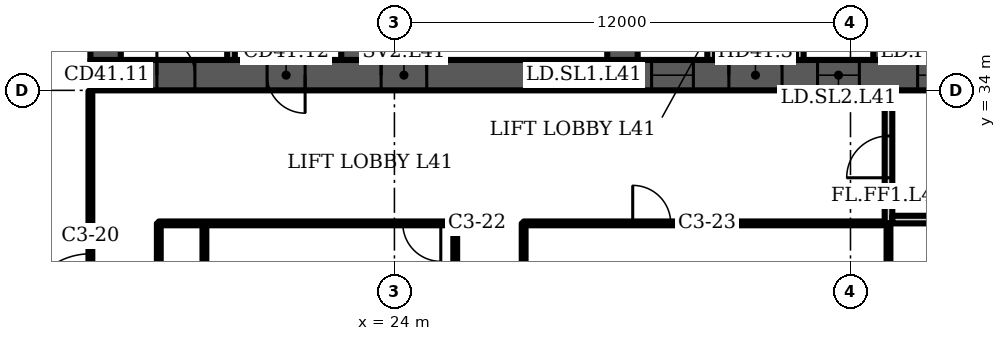
"""IFC4 building model, lengths in metres.
Left out: names, types, materials, properties, quantities, classifications, styles, units other than length and angle.
Written with IfcOpenShell. Run it as: python <this file> out.ifc"""

import sys

from ifc_helpers import new_model, si_unit, direction, frame, frame_2d, origin, place, context, subcontext, project, spatial, polyline, rectangle, outline, extrude, element, fill, save


model = new_model("IFC4")
c1 = context("Model", 3, precision=1e-05, world=origin(), true_north=direction((0.0, 1.0)))
c2 = subcontext(c1, "Body", "Model", "MODEL_VIEW")
j1 = project(units=[si_unit("LENGTHUNIT", "METRE"), si_unit("PLANEANGLEUNIT", "RADIAN")], contexts=[c1])
p1 = place(None, origin())
s1 = spatial("IfcSite", under=j1, at=p1, CompositionType="ELEMENT")
p2 = place(p1, origin())
s2 = spatial("IfcBuilding", under=s1, at=p2, CompositionType="ELEMENT")
p3 = place(p2, frame((0.0, 0.0, 169.9)))
s3 = spatial("IfcBuildingStorey", under=s2, at=p3, CompositionType="ELEMENT", Elevation=169.9)
p4 = place(p3, frame((16.0, 34.4, 0.0), z_axis=(0.0, 0.0, 1.0), x_axis=(1.0, 0.0, 0.0)))
e1 = element("IfcWall", 1, at=p4, inside=s3, PredefinedType="SHEAR", context=c2, shape_type="SweptSolid", body=[
    extrude(rectangle(XDim=42.0, YDim=0.8, at=frame_2d((21.0, 0.0))), origin(), (0.0, 0.0, 1.0), 3.6),
])
p5 = place(p4, frame((1.75, 0.0, 0.0)))
e2 = element("IfcOpeningElement", 2, at=p5, cuts=e1, PredefinedType="OPENING", context=c2, shape_type="SweptSolid", body=[
    extrude(rectangle(XDim=1.0, YDim=2.1, at=frame_2d((0.5, 1.05))), frame((0.0, 0.41, 0.0), z_axis=(0.0, -1.0, 0.0), x_axis=(1.0, 0.0, 0.0)), (0.0, 0.0, 1.0), 0.82),
])
p6 = place(p4, frame((4.65, 0.0, 0.0)))
e3 = element("IfcOpeningElement", 3, at=p6, cuts=e1, PredefinedType="OPENING", context=c2, shape_type="SweptSolid", body=[
    extrude(rectangle(XDim=1.0, YDim=2.1, at=frame_2d((0.5, 1.05))), frame((0.0, 0.41, 0.0), z_axis=(0.0, -1.0, 0.0), x_axis=(1.0, 0.0, 0.0)), (0.0, 0.0, 1.0), 0.82),
])
p7 = place(p4, frame((7.65, 0.0, 0.0)))
e4 = element("IfcOpeningElement", 4, at=p7, cuts=e1, PredefinedType="OPENING", context=c2, shape_type="SweptSolid", body=[
    extrude(rectangle(XDim=1.2, YDim=2.1, at=frame_2d((0.6, 1.05))), frame((0.0, 0.41, 0.0), z_axis=(0.0, -1.0, 0.0), x_axis=(1.0, 0.0, 0.0)), (0.0, 0.0, 1.0), 0.82),
])
p8 = place(p4, frame((14.767, 0.0, 0.0)))
e5 = element("IfcOpeningElement", 5, at=p8, cuts=e1, PredefinedType="OPENING", context=c2, shape_type="SweptSolid", body=[
    extrude(rectangle(XDim=1.1, YDim=2.1, at=frame_2d((0.55, 1.05))), frame((0.0, 0.41, 0.0), z_axis=(0.0, -1.0, 0.0), x_axis=(1.0, 0.0, 0.0)), (0.0, 0.0, 1.0), 0.82),
])
p9 = place(p4, frame((19.133, 0.0, 0.0)))
e6 = element("IfcOpeningElement", 6, at=p9, cuts=e1, PredefinedType="OPENING", context=c2, shape_type="SweptSolid", body=[
    extrude(rectangle(XDim=1.1, YDim=2.1, at=frame_2d((0.55, 1.05))), frame((0.0, 0.41, 0.0), z_axis=(0.0, -1.0, 0.0), x_axis=(1.0, 0.0, 0.0)), (0.0, 0.0, 1.0), 0.82),
])
p10 = place(p4, frame((16.8, 0.0, 0.0)))
e7 = element("IfcOpeningElement", 7, at=p10, cuts=e1, PredefinedType="OPENING", context=c2, shape_type="SweptSolid", body=[
    extrude(rectangle(XDim=1.4, YDim=2.1, at=frame_2d((0.7, 1.05))), frame((0.0, 0.41, 0.0), z_axis=(0.0, -1.0, 0.0), x_axis=(1.0, 0.0, 0.0)), (0.0, 0.0, 1.0), 0.82),
])
p11 = place(p4, frame((21.767, 0.0, 0.0)))
e8 = element("IfcOpeningElement", 8, at=p11, cuts=e1, PredefinedType="OPENING", context=c2, shape_type="SweptSolid", body=[
    extrude(rectangle(XDim=1.1, YDim=2.1, at=frame_2d((0.55, 1.05))), frame((0.0, 0.41, 0.0), z_axis=(0.0, -1.0, 0.0), x_axis=(1.0, 0.0, 0.0)), (0.0, 0.0, 1.0), 0.82),
])
p12 = place(p4, frame((23.95, 0.0, 0.0)))
e9 = element("IfcOpeningElement", 9, at=p12, cuts=e1, PredefinedType="OPENING", context=c2, shape_type="SweptSolid", body=[
    extrude(rectangle(XDim=1.1, YDim=2.1, at=frame_2d((0.55, 1.05))), frame((0.0, 0.41, 0.0), z_axis=(0.0, -1.0, 0.0), x_axis=(1.0, 0.0, 0.0)), (0.0, 0.0, 1.0), 0.82),
])
p13 = place(p4, frame((26.133, 0.0, 0.0)))
e10 = element("IfcOpeningElement", 10, at=p13, cuts=e1, PredefinedType="OPENING", context=c2, shape_type="SweptSolid", body=[
    extrude(rectangle(XDim=1.1, YDim=2.1, at=frame_2d((0.55, 1.05))), frame((0.0, 0.41, 0.0), z_axis=(0.0, -1.0, 0.0), x_axis=(1.0, 0.0, 0.0)), (0.0, 0.0, 1.0), 0.82),
])
p14 = place(p4, frame((33.15, 0.0, 0.0)))
e11 = element("IfcOpeningElement", 11, at=p14, cuts=e1, PredefinedType="OPENING", context=c2, shape_type="SweptSolid", body=[
    extrude(rectangle(XDim=1.2, YDim=2.1, at=frame_2d((0.6, 1.05))), frame((0.0, 0.41, 0.0), z_axis=(0.0, -1.0, 0.0), x_axis=(1.0, 0.0, 0.0)), (0.0, 0.0, 1.0), 0.82),
])
p15 = place(p4, frame((37.767, 0.0, 0.0)))
e12 = element("IfcOpeningElement", 12, at=p15, cuts=e1, PredefinedType="OPENING", context=c2, shape_type="SweptSolid", body=[
    extrude(rectangle(XDim=1.4, YDim=2.1, at=frame_2d((0.7, 1.05))), frame((0.0, 0.41, 0.0), z_axis=(0.0, -1.0, 0.0), x_axis=(1.0, 0.0, 0.0)), (0.0, 0.0, 1.0), 0.82),
])
p16 = place(p3, frame((16.4, 34.8, 0.0), z_axis=(0.0, 0.0, 1.0), x_axis=(0.0, 1.0, 0.0)))
e13 = element("IfcWall", 13, at=p16, inside=s3, PredefinedType="SHEAR", context=c2, shape_type="SweptSolid", body=[
    extrude(rectangle(XDim=13.184, YDim=0.8, at=frame_2d((6.592, 0.0))), origin(), (0.0, 0.0, 1.0), 3.6),
])
p17 = place(p3, frame((23.0, 34.8, 0.0), z_axis=(0.0, 0.0, 1.0), x_axis=(0.0, 1.0, 0.0)))
e14 = element("IfcWall", 14, at=p17, inside=s3, PredefinedType="SHEAR", context=c2, shape_type="SweptSolid", body=[
    extrude(rectangle(XDim=13.762, YDim=0.8, at=frame_2d((6.881, 0.0))), origin(), (0.0, 0.0, 1.0), 3.6),
])
p18 = place(p17, frame((10.0, 0.0, 0.0)))
e15 = element("IfcOpeningElement", 15, at=p18, cuts=e14, PredefinedType="OPENING", context=c2, shape_type="SweptSolid", body=[
    extrude(rectangle(XDim=1.0, YDim=2.1, at=frame_2d((0.5, 1.05))), frame((0.0, 0.41, 0.0), z_axis=(0.0, -1.0, 0.0), x_axis=(1.0, 0.0, 0.0)), (0.0, 0.0, 1.0), 0.82),
])
p19 = place(p3, frame((30.0, 34.8, 0.0), z_axis=(0.0, 0.0, 1.0), x_axis=(0.0, 1.0, 0.0)))
e16 = element("IfcWall", 16, at=p19, inside=s3, PredefinedType="SHEAR", context=c2, shape_type="SweptSolid", body=[
    extrude(rectangle(XDim=14.374, YDim=0.8, at=frame_2d((7.187, 0.0))), origin(), (0.0, 0.0, 1.0), 3.6),
])
p20 = place(p19, frame((3.6, 0.0, 0.0)))
e17 = element("IfcOpeningElement", 17, at=p20, cuts=e16, PredefinedType="OPENING", context=c2, shape_type="SweptSolid", body=[
    extrude(rectangle(XDim=1.1, YDim=2.1, at=frame_2d((0.55, 1.05))), frame((0.0, 0.41, 0.0), z_axis=(0.0, -1.0, 0.0), x_axis=(1.0, 0.0, 0.0)), (0.0, 0.0, 1.0), 0.82),
])
p21 = place(p3, frame((37.0, 34.8, 0.0), z_axis=(0.0, 0.0, 1.0), x_axis=(0.0, 1.0, 0.0)))
e18 = element("IfcWall", 18, at=p21, inside=s3, PredefinedType="SHEAR", context=c2, shape_type="SweptSolid", body=[
    extrude(rectangle(XDim=14.987, YDim=0.8, at=frame_2d((7.493, 0.0))), origin(), (0.0, 0.0, 1.0), 3.6),
])
p22 = place(p21, frame((11.312, 0.0, 0.0)))
e19 = element("IfcOpeningElement", 19, at=p22, cuts=e18, PredefinedType="OPENING", context=c2, shape_type="SweptSolid", body=[
    extrude(rectangle(XDim=1.0, YDim=2.1, at=frame_2d((0.5, 1.05))), frame((0.0, 0.41, 0.0), z_axis=(0.0, -1.0, 0.0), x_axis=(1.0, 0.0, 0.0)), (0.0, 0.0, 1.0), 0.82),
])
p23 = place(p21, frame((3.6, 0.0, 0.0)))
e20 = element("IfcOpeningElement", 20, at=p23, cuts=e18, PredefinedType="OPENING", context=c2, shape_type="SweptSolid", body=[
    extrude(rectangle(XDim=1.1, YDim=2.1, at=frame_2d((0.55, 1.05))), frame((0.0, 0.41, 0.0), z_axis=(0.0, -1.0, 0.0), x_axis=(1.0, 0.0, 0.0)), (0.0, 0.0, 1.0), 0.82),
])
p24 = place(p3, frame((19.7, 34.8, 0.0), z_axis=(0.0, 0.0, 1.0), x_axis=(0.0, 1.0, 0.0)))
e21 = element("IfcWall", 21, at=p24, inside=s3, PredefinedType="PARTITIONING", context=c2, shape_type="SweptSolid", body=[
    extrude(rectangle(XDim=13.234, YDim=0.2, at=frame_2d((6.617, 0.0))), origin(), (0.0, 0.0, 1.0), 3.2),
])
p25 = place(p3, origin())
e22 = element("IfcWall", 22, at=p25, inside=s3, PredefinedType="PARTITIONING", context=c2, shape_type="SweptSolid", body=[
    extrude(outline(polyline([(32.233, 37.65), (30.4, 37.65), (30.4, 37.85), (32.233, 37.85), (32.433, 37.85), (32.433, 34.8), (32.233, 34.8), (32.233, 37.65)])), origin(), (0.0, 0.0, 1.0), 3.2),
])
p26 = place(p3, origin())
e23 = element("IfcWall", 23, at=p26, inside=s3, PredefinedType="PARTITIONING", context=c2, shape_type="SweptSolid", body=[
    extrude(outline(polyline([(34.567, 37.85), (34.767, 37.85), (36.6, 37.85), (36.6, 37.65), (34.767, 37.65), (34.767, 34.8), (34.567, 34.8), (34.567, 37.85)])), origin(), (0.0, 0.0, 1.0), 3.2),
])
p27 = place(p3, origin())
e24 = element("IfcWall", 24, at=p27, inside=s3, PredefinedType="PARTITIONING", context=c2, shape_type="SweptSolid", body=[
    extrude(outline(polyline([(41.567, 37.1), (39.433, 37.1), (39.433, 34.8), (39.233, 34.8), (39.233, 37.65), (37.4, 37.65), (37.4, 37.85), (39.233, 37.85), (39.433, 37.85), (39.433, 37.3), (41.567, 37.3), (41.567, 37.55), (41.767, 37.55), (43.6, 37.55), (43.6, 37.35), (41.767, 37.35), (41.767, 34.8), (41.567, 34.8), (41.567, 37.1)])), origin(), (0.0, 0.0, 1.0), 3.2),
])
p28 = place(p3, frame((37.0, 30.5, 0.0), z_axis=(0.0, 0.0, 1.0), x_axis=(0.0, 1.0, 0.0)))
e25 = element("IfcWall", 25, at=p28, inside=s3, PredefinedType="PARTITIONING", context=c2, shape_type="SweptSolid", body=[
    extrude(rectangle(XDim=3.5, YDim=0.2, at=frame_2d((1.75, 0.0))), origin(), (0.0, 0.0, 1.0), 3.2),
])
p29 = place(p28, frame((1.2, 0.0, 0.0)))
e26 = element("IfcOpeningElement", 26, at=p29, cuts=e25, PredefinedType="OPENING", context=c2, shape_type="SweptSolid", body=[
    extrude(rectangle(XDim=1.1, YDim=2.1, at=frame_2d((0.55, 1.05))), frame((0.0, 0.11, 0.0), z_axis=(0.0, -1.0, 0.0), x_axis=(1.0, 0.0, 0.0)), (0.0, 0.0, 1.0), 0.22),
])
p30 = place(p3, frame((37.1, 30.6, 0.0), z_axis=(0.0, 0.0, 1.0), x_axis=(1.0, 0.0, 0.0)))
e27 = element("IfcWall", 27, at=p30, inside=s3, PredefinedType="PARTITIONING", context=c2, shape_type="SweptSolid", body=[
    extrude(rectangle(XDim=2.8, YDim=0.2, at=frame_2d((1.4, 0.0))), origin(), (0.0, 0.0, 1.0), 3.2),
])
p31 = place(p3, frame((16.0, 26.42, 0.0), z_axis=(0.0, 0.0, 1.0), x_axis=(0.0, 1.0, 0.0)))
e28 = element("IfcWall", 28, at=p31, inside=s3, PredefinedType="PARTITIONING", context=c2, shape_type="SweptSolid", body=[
    extrude(rectangle(XDim=7.56, YDim=0.1, at=frame_2d((3.78, 0.0))), origin(), (0.0, 0.0, 1.0), 3.2),
])
p32 = place(p31, frame((1.48, 0.0, 0.0)))
e29 = element("IfcOpeningElement", 29, at=p32, cuts=e28, PredefinedType="OPENING", context=c2, shape_type="SweptSolid", body=[
    extrude(rectangle(XDim=1.8, YDim=2.1, at=frame_2d((0.9, 1.05))), frame((0.0, 0.06, 0.0), z_axis=(0.0, -1.0, 0.0), x_axis=(1.0, 0.0, 0.0)), (0.0, 0.0, 1.0), 0.12),
])
p33 = place(p3, frame((17.8, 22.0, 0.0), z_axis=(0.0, 0.0, 1.0), x_axis=(0.0, 1.0, 0.0)))
e30 = element("IfcWall", 30, at=p33, inside=s3, PredefinedType="PARTITIONING", context=c2, shape_type="SweptSolid", body=[
    extrude(rectangle(XDim=8.5, YDim=0.1, at=frame_2d((4.25, 0.0))), origin(), (0.0, 0.0, 1.0), 3.2),
])
p34 = place(p33, frame((4.231, 0.0, 0.0)))
e31 = element("IfcOpeningElement", 31, at=p34, cuts=e30, PredefinedType="OPENING", context=c2, shape_type="SweptSolid", body=[
    extrude(rectangle(XDim=1.0, YDim=2.1, at=frame_2d((0.5, 1.05))), frame((0.0, 0.06, 0.0), z_axis=(0.0, -1.0, 0.0), x_axis=(1.0, 0.0, 0.0)), (0.0, 0.0, 1.0), 0.12),
])
p35 = place(p3, frame((17.8, 30.5, 0.0), z_axis=(0.0, 0.0, 1.0), x_axis=(1.0, 0.0, 0.0)))
e32 = element("IfcWall", 32, at=p35, inside=s3, PredefinedType="PARTITIONING", context=c2, shape_type="SweptSolid", body=[
    extrude(rectangle(XDim=7.8, YDim=0.1, at=frame_2d((3.9, 0.0))), origin(), (0.0, 0.0, 1.0), 3.2),
])
p36 = place(p35, frame((6.42, 0.0, 0.0)))
e33 = element("IfcOpeningElement", 33, at=p36, cuts=e32, PredefinedType="OPENING", context=c2, shape_type="SweptSolid", body=[
    extrude(rectangle(XDim=1.0, YDim=2.1, at=frame_2d((0.5, 1.05))), frame((0.0, 0.06, 0.0), z_axis=(0.0, -1.0, 0.0), x_axis=(1.0, 0.0, 0.0)), (0.0, 0.0, 1.0), 0.12),
])
p37 = place(p3, frame((19.0, 15.745, 0.0), z_axis=(0.0, 0.0, 1.0), x_axis=(0.0, 1.0, 0.0)))
e34 = element("IfcWall", 34, at=p37, inside=s3, PredefinedType="PARTITIONING", context=c2, shape_type="SweptSolid", body=[
    extrude(rectangle(XDim=14.755, YDim=0.1, at=frame_2d((7.377, 0.0))), origin(), (0.0, 0.0, 1.0), 3.2),
])
p38 = place(p3, frame((25.6, 14.67, 0.0), z_axis=(0.0, 0.0, 1.0), x_axis=(0.0, 1.0, 0.0)))
e35 = element("IfcWall", 35, at=p38, inside=s3, PredefinedType="PARTITIONING", context=c2, shape_type="SweptSolid", body=[
    extrude(rectangle(XDim=15.83, YDim=0.1, at=frame_2d((7.915, 0.0))), origin(), (0.0, 0.0, 1.0), 3.2),
])
p39 = place(p38, frame((3.175, 0.0, 0.0)))
e36 = element("IfcOpeningElement", 36, at=p39, cuts=e35, PredefinedType="OPENING", context=c2, shape_type="SweptSolid", body=[
    extrude(rectangle(XDim=1.0, YDim=2.1, at=frame_2d((0.5, 1.05))), frame((0.0, 0.06, 0.0), z_axis=(0.0, -1.0, 0.0), x_axis=(1.0, 0.0, 0.0)), (0.0, 0.0, 1.0), 0.12),
])
p40 = place(p38, frame((8.89, 0.0, 0.0)))
e37 = element("IfcOpeningElement", 37, at=p40, cuts=e35, PredefinedType="OPENING", context=c2, shape_type="SweptSolid", body=[
    extrude(rectangle(XDim=1.0, YDim=2.1, at=frame_2d((0.5, 1.05))), frame((0.0, 0.06, 0.0), z_axis=(0.0, -1.0, 0.0), x_axis=(1.0, 0.0, 0.0)), (0.0, 0.0, 1.0), 0.12),
])
p41 = place(p3, frame((27.4, 14.24, 0.0), z_axis=(0.0, 0.0, 1.0), x_axis=(0.0, 1.0, 0.0)))
e38 = element("IfcWall", 38, at=p41, inside=s3, PredefinedType="PARTITIONING", context=c2, shape_type="SweptSolid", body=[
    extrude(rectangle(XDim=16.26, YDim=0.1, at=frame_2d((8.13, 0.0))), origin(), (0.0, 0.0, 1.0), 3.2),
])
p42 = place(p41, frame((2.525, 0.0, 0.0)))
e39 = element("IfcOpeningElement", 39, at=p42, cuts=e38, PredefinedType="OPENING", context=c2, shape_type="SweptSolid", body=[
    extrude(rectangle(XDim=1.0, YDim=2.1, at=frame_2d((0.5, 1.05))), frame((0.0, 0.06, 0.0), z_axis=(0.0, -1.0, 0.0), x_axis=(1.0, 0.0, 0.0)), (0.0, 0.0, 1.0), 0.12),
])
p43 = place(p41, frame((5.475, 0.0, 0.0)))
e40 = element("IfcOpeningElement", 40, at=p43, cuts=e38, PredefinedType="OPENING", context=c2, shape_type="SweptSolid", body=[
    extrude(rectangle(XDim=1.0, YDim=2.1, at=frame_2d((0.5, 1.05))), frame((0.0, 0.06, 0.0), z_axis=(0.0, -1.0, 0.0), x_axis=(1.0, 0.0, 0.0)), (0.0, 0.0, 1.0), 0.12),
])
p44 = place(p41, frame((8.425, 0.0, 0.0)))
e41 = element("IfcOpeningElement", 41, at=p44, cuts=e38, PredefinedType="OPENING", context=c2, shape_type="SweptSolid", body=[
    extrude(rectangle(XDim=1.0, YDim=2.1, at=frame_2d((0.5, 1.05))), frame((0.0, 0.06, 0.0), z_axis=(0.0, -1.0, 0.0), x_axis=(1.0, 0.0, 0.0)), (0.0, 0.0, 1.0), 0.12),
])
p45 = place(p41, frame((11.38, 0.0, 0.0)))
e42 = element("IfcOpeningElement", 42, at=p45, cuts=e38, PredefinedType="OPENING", context=c2, shape_type="SweptSolid", body=[
    extrude(rectangle(XDim=1.0, YDim=2.1, at=frame_2d((0.5, 1.05))), frame((0.0, 0.06, 0.0), z_axis=(0.0, -1.0, 0.0), x_axis=(1.0, 0.0, 0.0)), (0.0, 0.0, 1.0), 0.12),
])
p46 = place(p3, frame((27.4, 30.5, 0.0), z_axis=(0.0, 0.0, 1.0), x_axis=(1.0, 0.0, 0.0)))
e43 = element("IfcWall", 43, at=p46, inside=s3, PredefinedType="PARTITIONING", context=c2, shape_type="SweptSolid", body=[
    extrude(rectangle(XDim=9.45, YDim=0.1, at=frame_2d((4.725, 0.0))), origin(), (0.0, 0.0, 1.0), 3.2),
])
p47 = place(p46, frame((2.87, 0.0, 0.0)))
e44 = element("IfcOpeningElement", 44, at=p47, cuts=e43, PredefinedType="OPENING", context=c2, shape_type="SweptSolid", body=[
    extrude(rectangle(XDim=1.0, YDim=2.1, at=frame_2d((0.5, 1.05))), frame((0.0, 0.06, 0.0), z_axis=(0.0, -1.0, 0.0), x_axis=(1.0, 0.0, 0.0)), (0.0, 0.0, 1.0), 0.12),
])
p48 = place(p3, frame((37.0, 15.745, 0.0), z_axis=(0.0, 0.0, 1.0), x_axis=(0.0, 1.0, 0.0)))
e45 = element("IfcWall", 45, at=p48, inside=s3, PredefinedType="PARTITIONING", context=c2, shape_type="SweptSolid", body=[
    extrude(rectangle(XDim=14.755, YDim=0.1, at=frame_2d((7.377, 0.0))), origin(), (0.0, 0.0, 1.0), 3.2),
])
p49 = place(p5, origin())
e46 = element("IfcDoor", 46, at=p49, inside=s3, OperationType="SINGLE_SWING_LEFT", PredefinedType="DOOR", context=c2, shape_type="SweptSolid", body=[
    extrude(rectangle(XDim=1.0, YDim=2.1, at=frame_2d((0.5, 1.05))), frame((0.0, 0.4, 0.0), z_axis=(0.0, -1.0, 0.0), x_axis=(1.0, 0.0, 0.0)), (0.0, 0.0, 1.0), 0.8),
])
fill(e2, e46)
p50 = place(p6, origin())
e47 = element("IfcDoor", 47, at=p50, inside=s3, OperationType="SINGLE_SWING_RIGHT", PredefinedType="DOOR", context=c2, shape_type="SweptSolid", body=[
    extrude(rectangle(XDim=1.0, YDim=2.1, at=frame_2d((0.5, 1.05))), frame((0.0, 0.4, 0.0), z_axis=(0.0, -1.0, 0.0), x_axis=(1.0, 0.0, 0.0)), (0.0, 0.0, 1.0), 0.8),
])
fill(e3, e47)
p51 = place(p7, origin())
e48 = element("IfcDoor", 48, at=p51, inside=s3, OperationType="SINGLE_SWING_LEFT", PredefinedType="DOOR", context=c2, shape_type="SweptSolid", body=[
    extrude(rectangle(XDim=1.2, YDim=2.1, at=frame_2d((0.6, 1.05))), frame((0.0, 0.025, 0.0), z_axis=(0.0, -1.0, 0.0), x_axis=(1.0, 0.0, 0.0)), (0.0, 0.0, 1.0), 0.05),
])
fill(e4, e48)
p52 = place(p8, origin())
e49 = element("IfcDoor", 49, at=p52, inside=s3, OperationType="DOUBLE_DOOR_SLIDING", PredefinedType="DOOR", context=c2, shape_type="SweptSolid", body=[
    extrude(rectangle(XDim=1.1, YDim=2.1, at=frame_2d((0.55, 1.05))), frame((0.0, 0.025, 0.0), z_axis=(0.0, -1.0, 0.0), x_axis=(1.0, 0.0, 0.0)), (0.0, 0.0, 1.0), 0.05),
])
fill(e5, e49)
p53 = place(p9, origin())
e50 = element("IfcDoor", 50, at=p53, inside=s3, OperationType="DOUBLE_DOOR_SLIDING", PredefinedType="DOOR", context=c2, shape_type="SweptSolid", body=[
    extrude(rectangle(XDim=1.1, YDim=2.1, at=frame_2d((0.55, 1.05))), frame((0.0, 0.025, 0.0), z_axis=(0.0, -1.0, 0.0), x_axis=(1.0, 0.0, 0.0)), (0.0, 0.0, 1.0), 0.05),
])
fill(e6, e50)
p54 = place(p10, origin())
e51 = element("IfcDoor", 51, at=p54, inside=s3, OperationType="DOUBLE_DOOR_SINGLE_SWING", PredefinedType="DOOR", context=c2, shape_type="SweptSolid", body=[
    extrude(rectangle(XDim=1.4, YDim=2.1, at=frame_2d((0.7, 1.05))), frame((0.0, 0.025, 0.0), z_axis=(0.0, -1.0, 0.0), x_axis=(1.0, 0.0, 0.0)), (0.0, 0.0, 1.0), 0.05),
])
fill(e7, e51)
p55 = place(p11, origin())
e52 = element("IfcDoor", 52, at=p55, inside=s3, OperationType="DOUBLE_DOOR_SLIDING", PredefinedType="DOOR", context=c2, shape_type="SweptSolid", body=[
    extrude(rectangle(XDim=1.1, YDim=2.1, at=frame_2d((0.55, 1.05))), frame((0.0, 0.025, 0.0), z_axis=(0.0, -1.0, 0.0), x_axis=(1.0, 0.0, 0.0)), (0.0, 0.0, 1.0), 0.05),
])
fill(e8, e52)
p56 = place(p29, origin())
e53 = element("IfcDoor", 53, at=p56, inside=s3, OperationType="SINGLE_SWING_LEFT", PredefinedType="DOOR", context=c2, shape_type="SweptSolid", body=[
    extrude(rectangle(XDim=1.1, YDim=2.1, at=frame_2d((0.55, 1.05))), frame((0.0, 0.025, 0.0), z_axis=(0.0, -1.0, 0.0), x_axis=(1.0, 0.0, 0.0)), (0.0, 0.0, 1.0), 0.05),
])
fill(e26, e53)
p57 = place(p32, origin())
e54 = element("IfcDoor", 54, at=p57, inside=s3, OperationType="DOUBLE_DOOR_SINGLE_SWING", PredefinedType="DOOR", context=c2, shape_type="SweptSolid", body=[
    extrude(rectangle(XDim=1.8, YDim=2.1, at=frame_2d((0.9, 1.05))), frame((0.0, 0.025, 0.0), z_axis=(0.0, -1.0, 0.0), x_axis=(1.0, 0.0, 0.0)), (0.0, 0.0, 1.0), 0.05),
])
fill(e29, e54)
p58 = place(p36, origin())
e55 = element("IfcDoor", 55, at=p58, inside=s3, OperationType="SINGLE_SWING_RIGHT", PredefinedType="DOOR", context=c2, shape_type="SweptSolid", body=[
    extrude(rectangle(XDim=1.0, YDim=2.1, at=frame_2d((0.5, 1.05))), frame((0.0, 0.025, 0.0), z_axis=(0.0, -1.0, 0.0), x_axis=(1.0, 0.0, 0.0)), (0.0, 0.0, 1.0), 0.05),
])
fill(e33, e55)
p59 = place(p47, origin())
e56 = element("IfcDoor", 56, at=p59, inside=s3, OperationType="SINGLE_SWING_LEFT", PredefinedType="DOOR", context=c2, shape_type="SweptSolid", body=[
    extrude(rectangle(XDim=1.0, YDim=2.1, at=frame_2d((0.5, 1.05))), frame((0.0, 0.025, 0.0), z_axis=(0.0, -1.0, 0.0), x_axis=(1.0, 0.0, 0.0)), (0.0, 0.0, 1.0), 0.05),
])
fill(e44, e56)
save(model, sys.argv[1])
